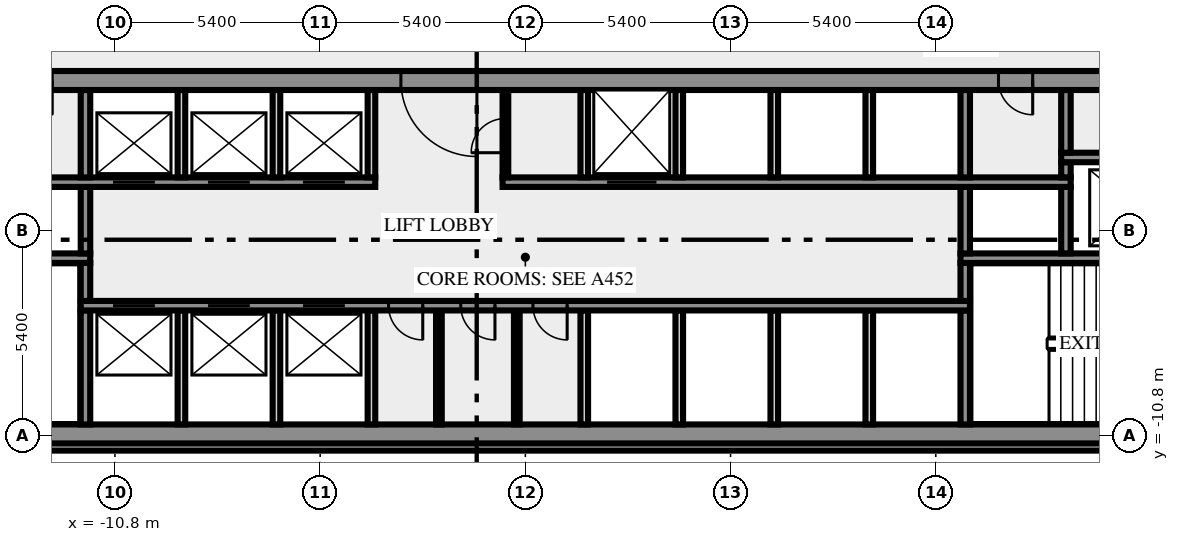
"""IFC4 building model, lengths in metres.
Left out: names, types, materials, properties, quantities, classifications, styles, units other than length and angle.
Written with IfcOpenShell. Run it as: python <this file> out.ifc"""

import sys

from ifc_helpers import new_model, si_unit, direction, frame, frame_2d, origin, place, context, subcontext, project, spatial, rectangle, extrude, element, fill, save


model = new_model("IFC4")
c1 = context("Model", 3, precision=1e-05, world=origin(), true_north=direction((0.0, 1.0)))
c2 = subcontext(c1, "Body", "Model", "MODEL_VIEW")
j1 = project(units=[si_unit("LENGTHUNIT", "METRE"), si_unit("PLANEANGLEUNIT", "RADIAN")], contexts=[c1])
p1 = place(None, origin())
s1 = spatial("IfcSite", under=j1, at=p1, CompositionType="ELEMENT")
p2 = place(p1, origin())
s2 = spatial("IfcBuilding", under=s1, at=p2, CompositionType="ELEMENT")
p3 = place(p2, frame((0.0, 0.0, 35.0)))
s3 = spatial("IfcBuildingStorey", under=s2, at=p3, CompositionType="ELEMENT", Elevation=35.0)
p4 = place(p3, frame((-17.444, -11.088, 0.0), z_axis=(0.0, 0.0, 1.0), x_axis=(1.0, 0.0, 0.0)))
e1 = element("IfcWall", 1, at=p4, inside=s3, PredefinedType="SOLIDWALL", context=c2, shape_type="SweptSolid", body=[
    extrude(rectangle(XDim=34.888, YDim=0.2, at=frame_2d((17.444, 0.0))), origin(), (0.0, 0.0, 1.0), 3.65),
])
p5 = place(p3, frame((-20.0, -10.75, 0.0), z_axis=(0.0, 0.0, 1.0), x_axis=(1.0, 0.0, 0.0)))
e2 = element("IfcWall", 2, at=p5, inside=s3, PredefinedType="SHEAR", context=c2, shape_type="SweptSolid", body=[
    extrude(rectangle(XDim=40.0, YDim=0.5, at=frame_2d((20.0, 0.0))), origin(), (0.0, 0.0, 1.0), 3.65),
])
p6 = place(p5, frame((0.8, 0.0, 1.0)))
e3 = element("IfcOpeningElement", 3, at=p6, cuts=e2, PredefinedType="OPENING", context=c2, shape_type="SweptSolid", body=[
    extrude(rectangle(XDim=1.2, YDim=1.2, at=frame_2d((0.6, 0.6))), frame((0.0, 0.26, 0.0), z_axis=(0.0, -1.0, 0.0), x_axis=(1.0, 0.0, 0.0)), (0.0, 0.0, 1.0), 0.52),
])
p7 = place(p5, frame((38.0, 0.0, 1.0)))
e4 = element("IfcOpeningElement", 4, at=p7, cuts=e2, PredefinedType="OPENING", context=c2, shape_type="SweptSolid", body=[
    extrude(rectangle(XDim=1.2, YDim=1.2, at=frame_2d((0.6, 0.6))), frame((0.0, 0.26, 0.0), z_axis=(0.0, -1.0, 0.0), x_axis=(1.0, 0.0, 0.0)), (0.0, 0.0, 1.0), 0.52),
])
p8 = place(p3, frame((-11.575, -10.5, 0.0), z_axis=(0.0, 0.0, 1.0), x_axis=(0.0, 1.0, 0.0)))
e5 = element("IfcWall", 5, at=p8, inside=s3, PredefinedType="SHEAR", context=c2, shape_type="SweptSolid", body=[
    extrude(rectangle(XDim=3.0, YDim=0.25, at=frame_2d((1.5, 0.0))), origin(), (0.0, 0.0, 1.0), 3.65),
])
for number, where, z_axis, x_axis in (
    (6, (-9.05, -10.5, 0.0), (0.0, 0.0, 1.0), (0.0, 1.0, 0.0)),
    (7, (-6.55, -10.5, 0.0), (0.0, 0.0, 1.0), (0.0, 1.0, 0.0)),
    (8, (-4.05, -10.5, 0.0), (0.0, 0.0, 1.0), (0.0, 1.0, 0.0)),
):
    element("IfcWall", number, at=place(p3, frame(where, z_axis=z_axis, x_axis=x_axis)), inside=s3, PredefinedType="SOLIDWALL", context=c2, shape_type="SweptSolid", body=[
        extrude(rectangle(XDim=3.0, YDim=0.2, at=frame_2d((1.5, 0.0))), origin(), (0.0, 0.0, 1.0), 3.65),
    ])
for number, where, z_axis, x_axis in (
    (9, (-2.275, -10.5, 0.0), (0.0, 0.0, 1.0), (0.0, 1.0, 0.0)),
    (10, (-0.225, -10.5, 0.0), (0.0, 0.0, 1.0), (0.0, 1.0, 0.0)),
):
    element("IfcWall", number, at=place(p3, frame(where, z_axis=z_axis, x_axis=x_axis)), inside=s3, PredefinedType="PARTITIONING", context=c2, shape_type="SweptSolid", body=[
        extrude(rectangle(XDim=3.0, YDim=0.15, at=frame_2d((1.5, 0.0))), origin(), (0.0, 0.0, 1.0), 3.65),
    ])
for number, where, z_axis, x_axis in (
    (11, (1.55, -10.5, 0.0), (0.0, 0.0, 1.0), (0.0, 1.0, 0.0)),
    (12, (4.05, -10.5, 0.0), (0.0, 0.0, 1.0), (0.0, 1.0, 0.0)),
    (13, (6.55, -10.5, 0.0), (0.0, 0.0, 1.0), (0.0, 1.0, 0.0)),
    (14, (9.05, -10.5, 0.0), (0.0, 0.0, 1.0), (0.0, 1.0, 0.0)),
):
    element("IfcWall", number, at=place(p3, frame(where, z_axis=z_axis, x_axis=x_axis)), inside=s3, PredefinedType="SOLIDWALL", context=c2, shape_type="SweptSolid", body=[
        extrude(rectangle(XDim=3.0, YDim=0.2, at=frame_2d((1.5, 0.0))), origin(), (0.0, 0.0, 1.0), 3.65),
    ])
p9 = place(p3, frame((11.575, -10.5, 0.0), z_axis=(0.0, 0.0, 1.0), x_axis=(0.0, 1.0, 0.0)))
e15 = element("IfcWall", 15, at=p9, inside=s3, PredefinedType="SHEAR", context=c2, shape_type="SweptSolid", body=[
    extrude(rectangle(XDim=3.0, YDim=0.25, at=frame_2d((1.5, 0.0))), origin(), (0.0, 0.0, 1.0), 3.65),
])
p10 = place(p3, frame((11.7, -7.375, 0.0), z_axis=(0.0, 0.0, 1.0), x_axis=(-1.0, 0.0, 0.0)))
e16 = element("IfcWall", 16, at=p10, inside=s3, PredefinedType="SHEAR", context=c2, shape_type="SweptSolid", body=[
    extrude(rectangle(XDim=23.4, YDim=0.25, at=frame_2d((11.7, 0.0))), origin(), (0.0, 0.0, 1.0), 3.65),
])
p11 = place(p10, frame((21.45, 0.0, 0.0)))
e17 = element("IfcOpeningElement", 17, at=p11, cuts=e16, PredefinedType="OPENING", context=c2, shape_type="SweptSolid", body=[
    extrude(rectangle(XDim=1.1, YDim=2.1, at=frame_2d((0.55, 1.05))), frame((0.0, 0.135, 0.0), z_axis=(0.0, -1.0, 0.0), x_axis=(1.0, 0.0, 0.0)), (0.0, 0.0, 1.0), 0.27),
])
p12 = place(p10, frame((18.95, 0.0, 0.0)))
e18 = element("IfcOpeningElement", 18, at=p12, cuts=e16, PredefinedType="OPENING", context=c2, shape_type="SweptSolid", body=[
    extrude(rectangle(XDim=1.1, YDim=2.1, at=frame_2d((0.55, 1.05))), frame((0.0, 0.135, 0.0), z_axis=(0.0, -1.0, 0.0), x_axis=(1.0, 0.0, 0.0)), (0.0, 0.0, 1.0), 0.27),
])
p13 = place(p10, frame((16.45, 0.0, 0.0)))
e19 = element("IfcOpeningElement", 19, at=p13, cuts=e16, PredefinedType="OPENING", context=c2, shape_type="SweptSolid", body=[
    extrude(rectangle(XDim=1.1, YDim=2.1, at=frame_2d((0.55, 1.05))), frame((0.0, 0.135, 0.0), z_axis=(0.0, -1.0, 0.0), x_axis=(1.0, 0.0, 0.0)), (0.0, 0.0, 1.0), 0.27),
])
p14 = place(p10, frame((14.4, 0.0, 0.0)))
e20 = element("IfcOpeningElement", 20, at=p14, cuts=e16, PredefinedType="OPENING", context=c2, shape_type="SweptSolid", body=[
    extrude(rectangle(XDim=0.9, YDim=2.1, at=frame_2d((0.45, 1.05))), frame((0.0, 0.135, 0.0), z_axis=(0.0, -1.0, 0.0), x_axis=(1.0, 0.0, 0.0)), (0.0, 0.0, 1.0), 0.27),
])
p15 = place(p10, frame((12.5, 0.0, 0.0)))
e21 = element("IfcOpeningElement", 21, at=p15, cuts=e16, PredefinedType="OPENING", context=c2, shape_type="SweptSolid", body=[
    extrude(rectangle(XDim=0.9, YDim=2.1, at=frame_2d((0.45, 1.05))), frame((0.0, 0.135, 0.0), z_axis=(0.0, -1.0, 0.0), x_axis=(1.0, 0.0, 0.0)), (0.0, 0.0, 1.0), 0.27),
])
p16 = place(p10, frame((10.6, 0.0, 0.0)))
e22 = element("IfcOpeningElement", 22, at=p16, cuts=e16, PredefinedType="OPENING", context=c2, shape_type="SweptSolid", body=[
    extrude(rectangle(XDim=0.9, YDim=2.1, at=frame_2d((0.45, 1.05))), frame((0.0, 0.135, 0.0), z_axis=(0.0, -1.0, 0.0), x_axis=(1.0, 0.0, 0.0)), (0.0, 0.0, 1.0), 0.27),
])
for number, where, z_axis, x_axis in (
    (23, (-11.575, -7.25, 0.0), (0.0, 0.0, 1.0), (0.0, 1.0, 0.0)),
    (24, (11.575, -7.25, 0.0), (0.0, 0.0, 1.0), (0.0, 1.0, 0.0)),
):
    element("IfcWall", number, at=place(p3, frame(where, z_axis=z_axis, x_axis=x_axis)), inside=s3, PredefinedType="SHEAR", context=c2, shape_type="SweptSolid", body=[
        extrude(rectangle(XDim=1.0, YDim=0.25, at=frame_2d((0.5, 0.0))), origin(), (0.0, 0.0, 1.0), 3.65),
    ])
p17 = place(p3, frame((-11.45, -6.125, 0.0), z_axis=(0.0, 0.0, 1.0), x_axis=(-1.0, 0.0, 0.0)))
e25 = element("IfcWall", 25, at=p17, inside=s3, PredefinedType="SHEAR", context=c2, shape_type="SweptSolid", body=[
    extrude(rectangle(XDim=8.05, YDim=0.25, at=frame_2d((4.025, 0.0))), origin(), (0.0, 0.0, 1.0), 3.65),
])
p18 = place(p17, frame((6.2, 0.0, 0.0)))
e26 = element("IfcOpeningElement", 26, at=p18, cuts=e25, PredefinedType="OPENING", context=c2, shape_type="SweptSolid", body=[
    extrude(rectangle(XDim=1.8, YDim=2.1, at=frame_2d((0.9, 1.05))), frame((0.0, 0.135, 0.0), z_axis=(0.0, -1.0, 0.0), x_axis=(1.0, 0.0, 0.0)), (0.0, 0.0, 1.0), 0.27),
])
p19 = place(p3, frame((19.5, -6.125, 0.0), z_axis=(0.0, 0.0, 1.0), x_axis=(-1.0, 0.0, 0.0)))
e27 = element("IfcWall", 27, at=p19, inside=s3, PredefinedType="SHEAR", context=c2, shape_type="SweptSolid", body=[
    extrude(rectangle(XDim=8.05, YDim=0.25, at=frame_2d((4.025, 0.0))), origin(), (0.0, 0.0, 1.0), 3.65),
])
p20 = place(p19, frame((0.05, 0.0, 0.0)))
e28 = element("IfcOpeningElement", 28, at=p20, cuts=e27, PredefinedType="OPENING", context=c2, shape_type="SweptSolid", body=[
    extrude(rectangle(XDim=1.8, YDim=2.1, at=frame_2d((0.9, 1.05))), frame((0.0, 0.135, 0.0), z_axis=(0.0, -1.0, 0.0), x_axis=(1.0, 0.0, 0.0)), (0.0, 0.0, 1.0), 0.27),
])
for number, where, z_axis, x_axis in (
    (29, (-11.575, -6.0, 0.0), (0.0, 0.0, 1.0), (0.0, 1.0, 0.0)),
    (30, (11.575, -6.0, 0.0), (0.0, 0.0, 1.0), (0.0, 1.0, 0.0)),
    (31, (14.225, -6.0, 0.0), (0.0, 0.0, 1.0), (0.0, 1.0, 0.0)),
):
    element("IfcWall", number, at=place(p3, frame(where, z_axis=z_axis, x_axis=x_axis)), inside=s3, PredefinedType="SHEAR", context=c2, shape_type="SweptSolid", body=[
        extrude(rectangle(XDim=1.75, YDim=0.25, at=frame_2d((0.875, 0.0))), origin(), (0.0, 0.0, 1.0), 3.65),
    ])
p21 = place(p3, frame((-14.35, -4.125, 0.0), z_axis=(0.0, 0.0, 1.0), x_axis=(1.0, 0.0, 0.0)))
e32 = element("IfcWall", 32, at=p21, inside=s3, PredefinedType="SHEAR", context=c2, shape_type="SweptSolid", body=[
    extrude(rectangle(XDim=10.4, YDim=0.25, at=frame_2d((5.2, 0.0))), origin(), (0.0, 0.0, 1.0), 3.65),
])
p22 = place(p21, frame((3.5, 0.0, 0.0)))
e33 = element("IfcOpeningElement", 33, at=p22, cuts=e32, PredefinedType="OPENING", context=c2, shape_type="SweptSolid", body=[
    extrude(rectangle(XDim=1.1, YDim=2.1, at=frame_2d((0.55, 1.05))), frame((0.0, 0.135, 0.0), z_axis=(0.0, -1.0, 0.0), x_axis=(1.0, 0.0, 0.0)), (0.0, 0.0, 1.0), 0.27),
])
p23 = place(p21, frame((6.0, 0.0, 0.0)))
e34 = element("IfcOpeningElement", 34, at=p23, cuts=e32, PredefinedType="OPENING", context=c2, shape_type="SweptSolid", body=[
    extrude(rectangle(XDim=1.1, YDim=2.1, at=frame_2d((0.55, 1.05))), frame((0.0, 0.135, 0.0), z_axis=(0.0, -1.0, 0.0), x_axis=(1.0, 0.0, 0.0)), (0.0, 0.0, 1.0), 0.27),
])
p24 = place(p21, frame((8.5, 0.0, 0.0)))
e35 = element("IfcOpeningElement", 35, at=p24, cuts=e32, PredefinedType="OPENING", context=c2, shape_type="SweptSolid", body=[
    extrude(rectangle(XDim=1.1, YDim=2.1, at=frame_2d((0.55, 1.05))), frame((0.0, 0.135, 0.0), z_axis=(0.0, -1.0, 0.0), x_axis=(1.0, 0.0, 0.0)), (0.0, 0.0, 1.0), 0.27),
])
p25 = place(p3, frame((-0.6, -4.125, 0.0), z_axis=(0.0, 0.0, 1.0), x_axis=(1.0, 0.0, 0.0)))
e36 = element("IfcWall", 36, at=p25, inside=s3, PredefinedType="SHEAR", context=c2, shape_type="SweptSolid", body=[
    extrude(rectangle(XDim=14.95, YDim=0.25, at=frame_2d((7.475, 0.0))), origin(), (0.0, 0.0, 1.0), 3.65),
])
p26 = place(p25, frame((2.75, 0.0, 0.0)))
e37 = element("IfcOpeningElement", 37, at=p26, cuts=e36, PredefinedType="OPENING", context=c2, shape_type="SweptSolid", body=[
    extrude(rectangle(XDim=1.3, YDim=2.1, at=frame_2d((0.65, 1.05))), frame((0.0, 0.135, 0.0), z_axis=(0.0, -1.0, 0.0), x_axis=(1.0, 0.0, 0.0)), (0.0, 0.0, 1.0), 0.27),
])
p27 = place(p3, frame((-11.575, -4.0, 0.0), z_axis=(0.0, 0.0, 1.0), x_axis=(0.0, 1.0, 0.0)))
e38 = element("IfcWall", 38, at=p27, inside=s3, PredefinedType="SHEAR", context=c2, shape_type="SweptSolid", body=[
    extrude(rectangle(XDim=2.3, YDim=0.25, at=frame_2d((1.15, 0.0))), origin(), (0.0, 0.0, 1.0), 3.65),
])
for number, where, z_axis, x_axis in (
    (39, (-9.05, -4.0, 0.0), (0.0, 0.0, 1.0), (0.0, 1.0, 0.0)),
    (40, (-6.55, -4.0, 0.0), (0.0, 0.0, 1.0), (0.0, 1.0, 0.0)),
    (41, (-4.05, -4.0, 0.0), (0.0, 0.0, 1.0), (0.0, 1.0, 0.0)),
):
    element("IfcWall", number, at=place(p3, frame(where, z_axis=z_axis, x_axis=x_axis)), inside=s3, PredefinedType="SOLIDWALL", context=c2, shape_type="SweptSolid", body=[
        extrude(rectangle(XDim=2.3, YDim=0.2, at=frame_2d((1.15, 0.0))), origin(), (0.0, 0.0, 1.0), 3.65),
    ])
p28 = place(p3, frame((-0.525, -4.0, 0.0), z_axis=(0.0, 0.0, 1.0), x_axis=(0.0, 1.0, 0.0)))
e42 = element("IfcWall", 42, at=p28, inside=s3, PredefinedType="PARTITIONING", context=c2, shape_type="SweptSolid", body=[
    extrude(rectangle(XDim=2.3, YDim=0.15, at=frame_2d((1.15, 0.0))), origin(), (0.0, 0.0, 1.0), 3.65),
])
p29 = place(p28, frame((0.65, 0.0, 0.0)))
e43 = element("IfcOpeningElement", 43, at=p29, cuts=e42, PredefinedType="OPENING", context=c2, shape_type="SweptSolid", body=[
    extrude(rectangle(XDim=0.9, YDim=2.1, at=frame_2d((0.45, 1.05))), frame((0.0, 0.085, 0.0), z_axis=(0.0, -1.0, 0.0), x_axis=(1.0, 0.0, 0.0)), (0.0, 0.0, 1.0), 0.17),
])
for number, where, z_axis, x_axis in (
    (44, (1.55, -4.0, 0.0), (0.0, 0.0, 1.0), (0.0, 1.0, 0.0)),
    (45, (4.05, -4.0, 0.0), (0.0, 0.0, 1.0), (0.0, 1.0, 0.0)),
    (46, (6.55, -4.0, 0.0), (0.0, 0.0, 1.0), (0.0, 1.0, 0.0)),
    (47, (9.05, -4.0, 0.0), (0.0, 0.0, 1.0), (0.0, 1.0, 0.0)),
):
    element("IfcWall", number, at=place(p3, frame(where, z_axis=z_axis, x_axis=x_axis)), inside=s3, PredefinedType="SOLIDWALL", context=c2, shape_type="SweptSolid", body=[
        extrude(rectangle(XDim=2.3, YDim=0.2, at=frame_2d((1.15, 0.0))), origin(), (0.0, 0.0, 1.0), 3.65),
    ])
p30 = place(p3, frame((11.575, -4.0, 0.0), z_axis=(0.0, 0.0, 1.0), x_axis=(0.0, 1.0, 0.0)))
e48 = element("IfcWall", 48, at=p30, inside=s3, PredefinedType="SHEAR", context=c2, shape_type="SweptSolid", body=[
    extrude(rectangle(XDim=2.3, YDim=0.25, at=frame_2d((1.15, 0.0))), origin(), (0.0, 0.0, 1.0), 3.65),
])
p31 = place(p3, frame((14.225, -4.0, 0.0), z_axis=(0.0, 0.0, 1.0), x_axis=(0.0, 1.0, 0.0)))
e49 = element("IfcWall", 49, at=p31, inside=s3, PredefinedType="SHEAR", context=c2, shape_type="SweptSolid", body=[
    extrude(rectangle(XDim=0.4, YDim=0.25, at=frame_2d((0.2, 0.0))), origin(), (0.0, 0.0, 1.0), 3.65),
])
p32 = place(p3, frame((14.1, -3.475, 0.0), z_axis=(0.0, 0.0, 1.0), x_axis=(1.0, 0.0, 0.0)))
e50 = element("IfcWall", 50, at=p32, inside=s3, PredefinedType="SHEAR", context=c2, shape_type="SweptSolid", body=[
    extrude(rectangle(XDim=3.25, YDim=0.25, at=frame_2d((1.625, 0.0))), origin(), (0.0, 0.0, 1.0), 3.65),
])
p33 = place(p3, frame((14.225, -3.35, 0.0), z_axis=(0.0, 0.0, 1.0), x_axis=(0.0, 1.0, 0.0)))
e51 = element("IfcWall", 51, at=p33, inside=s3, PredefinedType="SHEAR", context=c2, shape_type="SweptSolid", body=[
    extrude(rectangle(XDim=1.65, YDim=0.25, at=frame_2d((0.825, 0.0))), origin(), (0.0, 0.0, 1.0), 3.65),
])
p34 = place(p3, frame((20.49, -1.45, 0.0), z_axis=(0.0, 0.0, 1.0), x_axis=(-1.0, 0.0, 0.0)))
e52 = element("IfcWall", 52, at=p34, inside=s3, PredefinedType="SHEAR", context=c2, shape_type="SweptSolid", body=[
    extrude(rectangle(XDim=40.98, YDim=0.5, at=frame_2d((20.49, 0.0))), origin(), (0.0, 0.0, 1.0), 3.65),
])
p35 = place(p34, frame((38.14, 0.0, 0.0)))
e53 = element("IfcOpeningElement", 53, at=p35, cuts=e52, PredefinedType="OPENING", context=c2, shape_type="SweptSolid", body=[
    extrude(rectangle(XDim=1.8, YDim=2.1, at=frame_2d((0.9, 1.05))), frame((0.0, 0.26, 0.0), z_axis=(0.0, -1.0, 0.0), x_axis=(1.0, 0.0, 0.0)), (0.0, 0.0, 1.0), 0.52),
])
p36 = place(p34, frame((36.728, 0.0, 0.0)))
e54 = element("IfcOpeningElement", 54, at=p36, cuts=e52, PredefinedType="OPENING", context=c2, shape_type="SweptSolid", body=[
    extrude(rectangle(XDim=0.8, YDim=2.1, at=frame_2d((0.4, 1.05))), frame((0.0, 0.26, 0.0), z_axis=(0.0, -1.0, 0.0), x_axis=(1.0, 0.0, 0.0)), (0.0, 0.0, 1.0), 0.52),
])
p37 = place(p34, frame((35.153, 0.0, 0.0)))
e55 = element("IfcOpeningElement", 55, at=p37, cuts=e52, PredefinedType="OPENING", context=c2, shape_type="SweptSolid", body=[
    extrude(rectangle(XDim=0.8, YDim=2.1, at=frame_2d((0.4, 1.05))), frame((0.0, 0.26, 0.0), z_axis=(0.0, -1.0, 0.0), x_axis=(1.0, 0.0, 0.0)), (0.0, 0.0, 1.0), 0.52),
])
p38 = place(p34, frame((32.94, 0.0, 0.0)))
e56 = element("IfcOpeningElement", 56, at=p38, cuts=e52, PredefinedType="OPENING", context=c2, shape_type="SweptSolid", body=[
    extrude(rectangle(XDim=0.9, YDim=2.1, at=frame_2d((0.45, 1.05))), frame((0.0, 0.26, 0.0), z_axis=(0.0, -1.0, 0.0), x_axis=(1.0, 0.0, 0.0)), (0.0, 0.0, 1.0), 0.52),
])
p39 = place(p34, frame((21.765, 0.0, 0.0)))
e57 = element("IfcOpeningElement", 57, at=p39, cuts=e52, PredefinedType="OPENING", context=c2, shape_type="SweptSolid", body=[
    extrude(rectangle(XDim=2.0, YDim=2.1, at=frame_2d((1.0, 1.05))), frame((0.0, 0.26, 0.0), z_axis=(0.0, -1.0, 0.0), x_axis=(1.0, 0.0, 0.0)), (0.0, 0.0, 1.0), 0.52),
])
p40 = place(p34, frame((7.14, 0.0, 0.0)))
e58 = element("IfcOpeningElement", 58, at=p40, cuts=e52, PredefinedType="OPENING", context=c2, shape_type="SweptSolid", body=[
    extrude(rectangle(XDim=0.9, YDim=2.1, at=frame_2d((0.45, 1.05))), frame((0.0, 0.26, 0.0), z_axis=(0.0, -1.0, 0.0), x_axis=(1.0, 0.0, 0.0)), (0.0, 0.0, 1.0), 0.52),
])
p41 = place(p34, frame((4.19, 0.0, 0.0)))
e59 = element("IfcOpeningElement", 59, at=p41, cuts=e52, PredefinedType="OPENING", context=c2, shape_type="SweptSolid", body=[
    extrude(rectangle(XDim=0.9, YDim=2.1, at=frame_2d((0.45, 1.05))), frame((0.0, 0.26, 0.0), z_axis=(0.0, -1.0, 0.0), x_axis=(1.0, 0.0, 0.0)), (0.0, 0.0, 1.0), 0.52),
])
p42 = place(p34, frame((1.04, 0.0, 0.0)))
e60 = element("IfcOpeningElement", 60, at=p42, cuts=e52, PredefinedType="OPENING", context=c2, shape_type="SweptSolid", body=[
    extrude(rectangle(XDim=1.8, YDim=2.1, at=frame_2d((0.9, 1.05))), frame((0.0, 0.26, 0.0), z_axis=(0.0, -1.0, 0.0), x_axis=(1.0, 0.0, 0.0)), (0.0, 0.0, 1.0), 0.52),
])
p43 = place(p11, origin())
e61 = element("IfcDoor", 61, at=p43, inside=s3, OperationType="DOUBLE_DOOR_SLIDING", PredefinedType="DOOR", context=c2, shape_type="SweptSolid", body=[
    extrude(rectangle(XDim=1.1, YDim=2.1, at=frame_2d((0.55, 1.05))), frame((0.0, 0.025, 0.0), z_axis=(0.0, -1.0, 0.0), x_axis=(1.0, 0.0, 0.0)), (0.0, 0.0, 1.0), 0.05),
])
fill(e17, e61)
p44 = place(p12, origin())
e62 = element("IfcDoor", 62, at=p44, inside=s3, OperationType="DOUBLE_DOOR_SLIDING", PredefinedType="DOOR", context=c2, shape_type="SweptSolid", body=[
    extrude(rectangle(XDim=1.1, YDim=2.1, at=frame_2d((0.55, 1.05))), frame((0.0, 0.025, 0.0), z_axis=(0.0, -1.0, 0.0), x_axis=(1.0, 0.0, 0.0)), (0.0, 0.0, 1.0), 0.05),
])
fill(e18, e62)
p45 = place(p13, origin())
e63 = element("IfcDoor", 63, at=p45, inside=s3, OperationType="DOUBLE_DOOR_SLIDING", PredefinedType="DOOR", context=c2, shape_type="SweptSolid", body=[
    extrude(rectangle(XDim=1.1, YDim=2.1, at=frame_2d((0.55, 1.05))), frame((0.0, 0.025, 0.0), z_axis=(0.0, -1.0, 0.0), x_axis=(1.0, 0.0, 0.0)), (0.0, 0.0, 1.0), 0.05),
])
fill(e19, e63)
p46 = place(p14, origin())
e64 = element("IfcDoor", 64, at=p46, inside=s3, OperationType="SINGLE_SWING_RIGHT", PredefinedType="DOOR", context=c2, shape_type="SweptSolid", body=[
    extrude(rectangle(XDim=0.9, YDim=2.1, at=frame_2d((0.45, 1.05))), frame((0.0, 0.025, 0.0), z_axis=(0.0, -1.0, 0.0), x_axis=(1.0, 0.0, 0.0)), (0.0, 0.0, 1.0), 0.05),
])
fill(e20, e64)
p47 = place(p15, origin())
e65 = element("IfcDoor", 65, at=p47, inside=s3, OperationType="SINGLE_SWING_RIGHT", PredefinedType="DOOR", context=c2, shape_type="SweptSolid", body=[
    extrude(rectangle(XDim=0.9, YDim=2.1, at=frame_2d((0.45, 1.05))), frame((0.0, 0.025, 0.0), z_axis=(0.0, -1.0, 0.0), x_axis=(1.0, 0.0, 0.0)), (0.0, 0.0, 1.0), 0.05),
])
fill(e21, e65)
p48 = place(p16, origin())
e66 = element("IfcDoor", 66, at=p48, inside=s3, OperationType="SINGLE_SWING_LEFT", PredefinedType="DOOR", context=c2, shape_type="SweptSolid", body=[
    extrude(rectangle(XDim=0.9, YDim=2.1, at=frame_2d((0.45, 1.05))), frame((0.0, 0.025, 0.0), z_axis=(0.0, -1.0, 0.0), x_axis=(1.0, 0.0, 0.0)), (0.0, 0.0, 1.0), 0.05),
])
fill(e22, e66)
p49 = place(p22, origin())
e67 = element("IfcDoor", 67, at=p49, inside=s3, OperationType="DOUBLE_DOOR_SLIDING", PredefinedType="DOOR", context=c2, shape_type="SweptSolid", body=[
    extrude(rectangle(XDim=1.1, YDim=2.1, at=frame_2d((0.55, 1.05))), frame((0.0, 0.025, 0.0), z_axis=(0.0, -1.0, 0.0), x_axis=(1.0, 0.0, 0.0)), (0.0, 0.0, 1.0), 0.05),
])
fill(e33, e67)
p50 = place(p23, origin())
e68 = element("IfcDoor", 68, at=p50, inside=s3, OperationType="DOUBLE_DOOR_SLIDING", PredefinedType="DOOR", context=c2, shape_type="SweptSolid", body=[
    extrude(rectangle(XDim=1.1, YDim=2.1, at=frame_2d((0.55, 1.05))), frame((0.0, 0.025, 0.0), z_axis=(0.0, -1.0, 0.0), x_axis=(1.0, 0.0, 0.0)), (0.0, 0.0, 1.0), 0.05),
])
fill(e34, e68)
p51 = place(p24, origin())
e69 = element("IfcDoor", 69, at=p51, inside=s3, OperationType="DOUBLE_DOOR_SLIDING", PredefinedType="DOOR", context=c2, shape_type="SweptSolid", body=[
    extrude(rectangle(XDim=1.1, YDim=2.1, at=frame_2d((0.55, 1.05))), frame((0.0, 0.025, 0.0), z_axis=(0.0, -1.0, 0.0), x_axis=(1.0, 0.0, 0.0)), (0.0, 0.0, 1.0), 0.05),
])
fill(e35, e69)
p52 = place(p26, origin())
e70 = element("IfcDoor", 70, at=p52, inside=s3, OperationType="DOUBLE_DOOR_SLIDING", PredefinedType="DOOR", context=c2, shape_type="SweptSolid", body=[
    extrude(rectangle(XDim=1.3, YDim=2.1, at=frame_2d((0.65, 1.05))), frame((0.0, 0.025, 0.0), z_axis=(0.0, -1.0, 0.0), x_axis=(1.0, 0.0, 0.0)), (0.0, 0.0, 1.0), 0.05),
])
fill(e37, e70)
p53 = place(p29, origin())
e71 = element("IfcDoor", 71, at=p53, inside=s3, OperationType="SINGLE_SWING_LEFT", PredefinedType="DOOR", context=c2, shape_type="SweptSolid", body=[
    extrude(rectangle(XDim=0.9, YDim=2.1, at=frame_2d((0.45, 1.05))), frame((0.0, 0.025, 0.0), z_axis=(0.0, -1.0, 0.0), x_axis=(1.0, 0.0, 0.0)), (0.0, 0.0, 1.0), 0.05),
])
fill(e43, e71)
p54 = place(p39, origin())
e72 = element("IfcDoor", 72, at=p54, inside=s3, OperationType="DOUBLE_DOOR_SINGLE_SWING", PredefinedType="DOOR", context=c2, shape_type="SweptSolid", body=[
    extrude(rectangle(XDim=2.0, YDim=2.1, at=frame_2d((1.0, 1.05))), frame((0.0, 0.025, 0.0), z_axis=(0.0, -1.0, 0.0), x_axis=(1.0, 0.0, 0.0)), (0.0, 0.0, 1.0), 0.05),
])
fill(e57, e72)
p55 = place(p40, origin())
e73 = element("IfcDoor", 73, at=p55, inside=s3, OperationType="SINGLE_SWING_LEFT", PredefinedType="DOOR", context=c2, shape_type="SweptSolid", body=[
    extrude(rectangle(XDim=0.9, YDim=2.1, at=frame_2d((0.45, 1.05))), frame((0.0, 0.025, 0.0), z_axis=(0.0, -1.0, 0.0), x_axis=(1.0, 0.0, 0.0)), (0.0, 0.0, 1.0), 0.05),
])
fill(e58, e73)
save(model, sys.argv[1])
